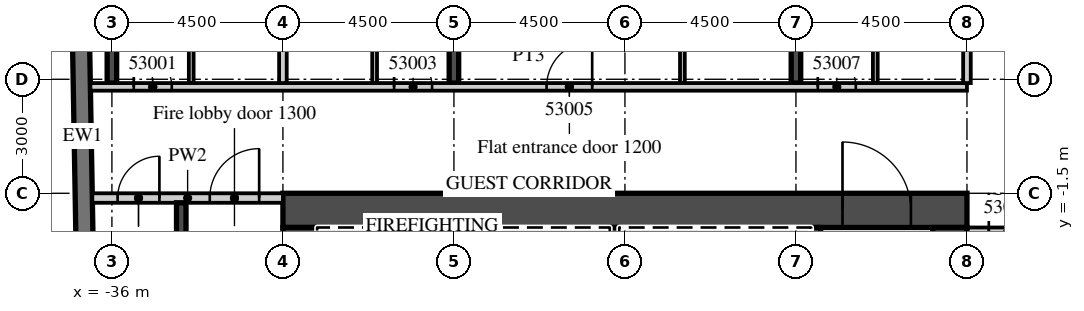
"""IFC4 building model, lengths in metres.
Left out: names, types, materials, properties, quantities, classifications, styles, units other than length and angle.
Written with IfcOpenShell. Run it as: python <this file> out.ifc"""

import sys

from ifc_helpers import new_model, si_unit, direction, frame, frame_2d, origin, place, context, subcontext, project, spatial, rectangle, extrude, element, fill, save


model = new_model("IFC4")
c1 = context("Model", 3, precision=1e-05, world=origin(), true_north=direction((0.0, 1.0)))
c2 = subcontext(c1, "Body", "Model", "MODEL_VIEW")
j1 = project(units=[si_unit("LENGTHUNIT", "METRE"), si_unit("PLANEANGLEUNIT", "RADIAN")], contexts=[c1])
p1 = place(None, origin())
s1 = spatial("IfcSite", under=j1, at=p1, CompositionType="ELEMENT")
p2 = place(p1, origin())
s2 = spatial("IfcBuilding", under=s1, at=p2, CompositionType="ELEMENT")
p3 = place(p2, frame((0.0, 0.0, 221.0)))
s3 = spatial("IfcBuildingStorey", under=s2, at=p3, CompositionType="ELEMENT", Elevation=221.0)
p4 = place(p3, frame((-36.0, 1.4, 0.0), z_axis=(0.0, 0.0, 1.0), x_axis=(0.0, 1.0, 0.0)))
e1 = element("IfcWall", 1, at=p4, inside=s3, PredefinedType="SHEAR", context=c2, shape_type="SweptSolid", body=[
    extrude(rectangle(XDim=17.125, YDim=0.25, at=frame_2d((8.563, 0.0))), origin(), (0.0, 0.0, 1.0), 3.3),
])
p5 = place(p3, frame((-27.0, 1.4, 0.0), z_axis=(0.0, 0.0, 1.0), x_axis=(0.0, 1.0, 0.0)))
e2 = element("IfcWall", 2, at=p5, inside=s3, PredefinedType="SHEAR", context=c2, shape_type="SweptSolid", body=[
    extrude(rectangle(XDim=18.817, YDim=0.25, at=frame_2d((9.409, 0.0))), origin(), (0.0, 0.0, 1.0), 3.3),
])
p6 = place(p3, frame((-18.0, 1.4, 0.0), z_axis=(0.0, 0.0, 1.0), x_axis=(0.0, 1.0, 0.0)))
e3 = element("IfcWall", 3, at=p6, inside=s3, PredefinedType="SHEAR", context=c2, shape_type="SweptSolid", body=[
    extrude(rectangle(XDim=18.974, YDim=0.25, at=frame_2d((9.487, 0.0))), origin(), (0.0, 0.0, 1.0), 3.3),
])
p7 = place(p3, frame((-37.057, 16.503, 0.0), z_axis=(0.0, 0.0, 1.0), x_axis=(0.017452279857, -0.999847697366, 0.0)))
e4 = element("IfcWall", 4, at=p7, inside=s3, PredefinedType="SOLIDWALL", context=c2, shape_type="SweptSolid", body=[
    extrude(rectangle(XDim=33.0, YDim=0.45, at=frame_2d((16.5, 0.0))), origin(), (0.0, 0.0, 1.0), 3.02),
])
p8 = place(p3, frame((-36.566, 1.3, 0.0), z_axis=(0.0, 0.0, 1.0), x_axis=(1.0, 0.0, 0.0)))
e5 = element("IfcWall", 5, at=p8, inside=s3, PredefinedType="PARTITIONING", context=c2, shape_type="SweptSolid", body=[
    extrude(rectangle(XDim=23.066, YDim=0.2, at=frame_2d((11.533, 0.0))), origin(), (0.0, 0.0, 1.0), 3.02),
])
p9 = place(p8, frame((1.141, 0.0, 0.0)))
e6 = element("IfcOpeningElement", 6, at=p9, cuts=e5, PredefinedType="OPENING", context=c2, shape_type="SweptSolid", body=[
    extrude(rectangle(XDim=1.0, YDim=2.1, at=frame_2d((0.5, 1.05))), frame((0.0, 0.11, 0.0), z_axis=(0.0, -1.0, 0.0), x_axis=(1.0, 0.0, 0.0)), (0.0, 0.0, 1.0), 0.22),
])
p10 = place(p8, frame((7.991, 0.0, 0.0)))
e7 = element("IfcOpeningElement", 7, at=p10, cuts=e5, PredefinedType="OPENING", context=c2, shape_type="SweptSolid", body=[
    extrude(rectangle(XDim=1.0, YDim=2.1, at=frame_2d((0.5, 1.05))), frame((0.0, 0.11, 0.0), z_axis=(0.0, -1.0, 0.0), x_axis=(1.0, 0.0, 0.0)), (0.0, 0.0, 1.0), 0.22),
])
p11 = place(p8, frame((12.004, 0.0, 0.0)))
e8 = element("IfcOpeningElement", 8, at=p11, cuts=e5, PredefinedType="OPENING", context=c2, shape_type="SweptSolid", body=[
    extrude(rectangle(XDim=1.2, YDim=2.1, at=frame_2d((0.6, 1.05))), frame((0.0, 0.11, 0.0), z_axis=(0.0, -1.0, 0.0), x_axis=(1.0, 0.0, 0.0)), (0.0, 0.0, 1.0), 0.22),
])
p12 = place(p8, frame((19.141, 0.0, 0.0)))
e9 = element("IfcOpeningElement", 9, at=p12, cuts=e5, PredefinedType="OPENING", context=c2, shape_type="SweptSolid", body=[
    extrude(rectangle(XDim=1.0, YDim=2.1, at=frame_2d((0.5, 1.05))), frame((0.0, 0.11, 0.0), z_axis=(0.0, -1.0, 0.0), x_axis=(1.0, 0.0, 0.0)), (0.0, 0.0, 1.0), 0.22),
])
p13 = place(p3, frame((-31.5, 1.4, 0.0), z_axis=(0.0, 0.0, 1.0), x_axis=(0.0, 1.0, 0.0)))
e10 = element("IfcWall", 10, at=p13, inside=s3, PredefinedType="PARTITIONING", context=c2, shape_type="SweptSolid", body=[
    extrude(rectangle(XDim=18.751, YDim=0.2, at=frame_2d((9.375, 0.0))), origin(), (0.0, 0.0, 1.0), 3.02),
])
p14 = place(p3, frame((-33.913, 1.4, 0.0), z_axis=(0.0, 0.0, 1.0), x_axis=(0.0, 1.0, 0.0)))
e11 = element("IfcWall", 11, at=p14, inside=s3, PredefinedType="PARTITIONING", context=c2, shape_type="SweptSolid", body=[
    extrude(rectangle(XDim=6.725, YDim=0.125, at=frame_2d((3.363, 0.0))), origin(), (0.0, 0.0, 1.0), 3.02),
])
p15 = place(p14, frame((2.45, 0.0, 0.0)))
e12 = element("IfcOpeningElement", 12, at=p15, cuts=e11, PredefinedType="OPENING", context=c2, shape_type="SweptSolid", body=[
    extrude(rectangle(XDim=0.9, YDim=2.1, at=frame_2d((0.45, 1.05))), frame((0.0, 0.073, 0.0), z_axis=(0.0, -1.0, 0.0), x_axis=(1.0, 0.0, 0.0)), (0.0, 0.0, 1.0), 0.145),
])
p16 = place(p3, frame((-29.087, 1.4, 0.0), z_axis=(0.0, 0.0, 1.0), x_axis=(0.0, 1.0, 0.0)))
e13 = element("IfcWall", 13, at=p16, inside=s3, PredefinedType="PARTITIONING", context=c2, shape_type="SweptSolid", body=[
    extrude(rectangle(XDim=6.725, YDim=0.125, at=frame_2d((3.363, 0.0))), origin(), (0.0, 0.0, 1.0), 3.02),
])
p17 = place(p16, frame((2.45, 0.0, 0.0)))
e14 = element("IfcOpeningElement", 14, at=p17, cuts=e13, PredefinedType="OPENING", context=c2, shape_type="SweptSolid", body=[
    extrude(rectangle(XDim=0.9, YDim=2.1, at=frame_2d((0.45, 1.05))), frame((0.0, 0.073, 0.0), z_axis=(0.0, -1.0, 0.0), x_axis=(1.0, 0.0, 0.0)), (0.0, 0.0, 1.0), 0.145),
])
p18 = place(p3, frame((-20.988, 1.4, 0.0), z_axis=(0.0, 0.0, 1.0), x_axis=(0.0, 1.0, 0.0)))
e15 = element("IfcWall", 15, at=p18, inside=s3, PredefinedType="PARTITIONING", context=c2, shape_type="SweptSolid", body=[
    extrude(rectangle(XDim=6.725, YDim=0.125, at=frame_2d((3.363, 0.0))), origin(), (0.0, 0.0, 1.0), 3.02),
])
p19 = place(p18, frame((2.45, 0.0, 0.0)))
e16 = element("IfcOpeningElement", 16, at=p19, cuts=e15, PredefinedType="OPENING", context=c2, shape_type="SweptSolid", body=[
    extrude(rectangle(XDim=0.9, YDim=2.1, at=frame_2d((0.45, 1.05))), frame((0.0, 0.073, 0.0), z_axis=(0.0, -1.0, 0.0), x_axis=(1.0, 0.0, 0.0)), (0.0, 0.0, 1.0), 0.145),
])
p20 = place(p3, frame((-13.5, 1.4, 0.0), z_axis=(0.0, 0.0, 1.0), x_axis=(0.0, 1.0, 0.0)))
e17 = element("IfcWall", 17, at=p20, inside=s3, PredefinedType="PARTITIONING", context=c2, shape_type="SweptSolid", body=[
    extrude(rectangle(XDim=19.065, YDim=0.2, at=frame_2d((9.533, 0.0))), origin(), (0.0, 0.0, 1.0), 3.02),
])
p21 = place(p3, frame((-15.912, 1.4, 0.0), z_axis=(0.0, 0.0, 1.0), x_axis=(0.0, 1.0, 0.0)))
e18 = element("IfcWall", 18, at=p21, inside=s3, PredefinedType="PARTITIONING", context=c2, shape_type="SweptSolid", body=[
    extrude(rectangle(XDim=6.725, YDim=0.125, at=frame_2d((3.363, 0.0))), origin(), (0.0, 0.0, 1.0), 3.02),
])
p22 = place(p21, frame((2.45, 0.0, 0.0)))
e19 = element("IfcOpeningElement", 19, at=p22, cuts=e18, PredefinedType="OPENING", context=c2, shape_type="SweptSolid", body=[
    extrude(rectangle(XDim=0.9, YDim=2.1, at=frame_2d((0.45, 1.05))), frame((0.0, 0.073, 0.0), z_axis=(0.0, -1.0, 0.0), x_axis=(1.0, 0.0, 0.0)), (0.0, 0.0, 1.0), 0.145),
])
p23 = place(p3, frame((-13.5, -2.5, 0.0), z_axis=(0.0, 0.0, 1.0), x_axis=(1.0, 0.0, 0.0)))
e20 = element("IfcWall", 20, at=p23, inside=s3, PredefinedType="PARTITIONING", context=c2, shape_type="SweptSolid", body=[
    extrude(rectangle(XDim=27.0, YDim=0.2, at=frame_2d((13.5, 0.0))), origin(), (0.0, 0.0, 1.0), 3.02),
])
p24 = place(p23, frame((0.575, 0.0, 0.0)))
e21 = element("IfcOpeningElement", 21, at=p24, cuts=e20, PredefinedType="OPENING", context=c2, shape_type="SweptSolid", body=[
    extrude(rectangle(XDim=1.0, YDim=2.1, at=frame_2d((0.5, 1.05))), frame((0.0, 0.11, 0.0), z_axis=(0.0, -1.0, 0.0), x_axis=(1.0, 0.0, 0.0)), (0.0, 0.0, 1.0), 0.22),
])
p25 = place(p23, frame((6.938, 0.0, 0.0)))
e22 = element("IfcOpeningElement", 22, at=p25, cuts=e20, PredefinedType="OPENING", context=c2, shape_type="SweptSolid", body=[
    extrude(rectangle(XDim=1.2, YDim=2.1, at=frame_2d((0.6, 1.05))), frame((0.0, 0.11, 0.0), z_axis=(0.0, -1.0, 0.0), x_axis=(1.0, 0.0, 0.0)), (0.0, 0.0, 1.0), 0.22),
])
p26 = place(p23, frame((15.938, 0.0, 0.0)))
e23 = element("IfcOpeningElement", 23, at=p26, cuts=e20, PredefinedType="OPENING", context=c2, shape_type="SweptSolid", body=[
    extrude(rectangle(XDim=1.2, YDim=2.1, at=frame_2d((0.6, 1.05))), frame((0.0, 0.11, 0.0), z_axis=(0.0, -1.0, 0.0), x_axis=(1.0, 0.0, 0.0)), (0.0, 0.0, 1.0), 0.22),
])
p27 = place(p23, frame((25.425, 0.0, 0.0)))
e24 = element("IfcOpeningElement", 24, at=p27, cuts=e20, PredefinedType="OPENING", context=c2, shape_type="SweptSolid", body=[
    extrude(rectangle(XDim=1.0, YDim=2.1, at=frame_2d((0.5, 1.05))), frame((0.0, 0.11, 0.0), z_axis=(0.0, -1.0, 0.0), x_axis=(1.0, 0.0, 0.0)), (0.0, 0.0, 1.0), 0.22),
])
p28 = place(p3, frame((-31.5, -1.95, 0.0), z_axis=(0.0, 0.0, 1.0), x_axis=(1.0, 0.0, 0.0)))
e25 = element("IfcWall", 25, at=p28, inside=s3, PredefinedType="SHEAR", context=c2, shape_type="SweptSolid", body=[
    extrude(rectangle(XDim=18.0, YDim=0.9, at=frame_2d((9.0, 0.0))), origin(), (0.0, 0.0, 1.0), 3.02),
])
p29 = place(p28, frame((14.725, 0.0, 0.0)))
e26 = element("IfcOpeningElement", 26, at=p29, cuts=e25, PredefinedType="OPENING", context=c2, shape_type="SweptSolid", body=[
    extrude(rectangle(XDim=1.8, YDim=2.1, at=frame_2d((0.9, 1.05))), frame((0.0, 0.46, 0.0), z_axis=(0.0, -1.0, 0.0), x_axis=(1.0, 0.0, 0.0)), (0.0, 0.0, 1.0), 0.92),
])
p30 = place(p3, frame((-31.05, -15.2, 0.0), z_axis=(0.0, 0.0, 1.0), x_axis=(0.0, 1.0, 0.0)))
e27 = element("IfcWall", 27, at=p30, inside=s3, PredefinedType="SHEAR", context=c2, shape_type="SweptSolid", body=[
    extrude(rectangle(XDim=12.8, YDim=0.9, at=frame_2d((6.4, 0.0))), origin(), (0.0, 0.0, 1.0), 3.02),
])
p31 = place(p30, frame((11.5, 0.0, 0.0)))
e28 = element("IfcOpeningElement", 28, at=p31, cuts=e27, PredefinedType="OPENING", context=c2, shape_type="SweptSolid", body=[
    extrude(rectangle(XDim=1.1, YDim=2.1, at=frame_2d((0.55, 1.05))), frame((0.0, 0.46, 0.0), z_axis=(0.0, -1.0, 0.0), x_axis=(1.0, 0.0, 0.0)), (0.0, 0.0, 1.0), 0.92),
])
p32 = place(p3, frame((-13.95, -14.6, 0.0), z_axis=(0.0, 0.0, 1.0), x_axis=(0.0, 1.0, 0.0)))
e29 = element("IfcWall", 29, at=p32, inside=s3, PredefinedType="SHEAR", context=c2, shape_type="SweptSolid", body=[
    extrude(rectangle(XDim=12.2, YDim=0.9, at=frame_2d((6.1, 0.0))), origin(), (0.0, 0.0, 1.0), 3.02),
])
p33 = place(p3, frame((-17.475, -5.55, 0.0), z_axis=(0.0, 0.0, 1.0), x_axis=(0.0, 1.0, 0.0)))
e30 = element("IfcWall", 30, at=p33, inside=s3, PredefinedType="SHEAR", context=c2, shape_type="SweptSolid", body=[
    extrude(rectangle(XDim=3.15, YDim=0.25, at=frame_2d((1.575, 0.0))), origin(), (0.0, 0.0, 1.0), 3.02),
])
for number, where, z_axis, x_axis in (
    (31, (-27.975, -5.3, 0.0), (0.0, 0.0, 1.0), (0.0, 1.0, 0.0)),
    (32, (-22.775, -5.3, 0.0), (0.0, 0.0, 1.0), (0.0, 1.0, 0.0)),
):
    element("IfcWall", number, at=place(p3, frame(where, z_axis=z_axis, x_axis=x_axis)), inside=s3, PredefinedType="SHEAR", context=c2, shape_type="SweptSolid", body=[
        extrude(rectangle(XDim=2.9, YDim=0.25, at=frame_2d((1.45, 0.0))), origin(), (0.0, 0.0, 1.0), 3.02),
    ])
p34 = place(p3, frame((-36.515, -1.625, 0.0), z_axis=(0.0, 0.0, 1.0), x_axis=(1.0, 0.0, 0.0)))
e33 = element("IfcWall", 33, at=p34, inside=s3, PredefinedType="PARTITIONING", context=c2, shape_type="SweptSolid", body=[
    extrude(rectangle(XDim=5.015, YDim=0.25, at=frame_2d((2.508, 0.0))), origin(), (0.0, 0.0, 1.0), 3.02),
])
p35 = place(p34, frame((3.09, 0.0, 0.0)))
e34 = element("IfcOpeningElement", 34, at=p35, cuts=e33, PredefinedType="OPENING", context=c2, shape_type="SweptSolid", body=[
    extrude(rectangle(XDim=1.3, YDim=2.1, at=frame_2d((0.65, 1.05))), frame((0.0, 0.135, 0.0), z_axis=(0.0, -1.0, 0.0), x_axis=(1.0, 0.0, 0.0)), (0.0, 0.0, 1.0), 0.27),
])
p36 = place(p34, frame((0.665, 0.0, 0.0)))
e35 = element("IfcOpeningElement", 35, at=p36, cuts=e33, PredefinedType="OPENING", context=c2, shape_type="SweptSolid", body=[
    extrude(rectangle(XDim=1.1, YDim=2.1, at=frame_2d((0.55, 1.05))), frame((0.0, 0.135, 0.0), z_axis=(0.0, -1.0, 0.0), x_axis=(1.0, 0.0, 0.0)), (0.0, 0.0, 1.0), 0.27),
])
p37 = place(p3, frame((-34.175, -10.1, 0.0), z_axis=(0.0, 0.0, 1.0), x_axis=(0.0, 1.0, 0.0)))
e36 = element("IfcWall", 36, at=p37, inside=s3, PredefinedType="SHEAR", context=c2, shape_type="SweptSolid", body=[
    extrude(rectangle(XDim=8.35, YDim=0.25, at=frame_2d((4.175, 0.0))), origin(), (0.0, 0.0, 1.0), 3.02),
])
p38 = place(p9, origin())
e37 = element("IfcDoor", 37, at=p38, inside=s3, OperationType="SINGLE_SWING_LEFT", PredefinedType="DOOR", context=c2, shape_type="SweptSolid", body=[
    extrude(rectangle(XDim=1.0, YDim=2.1, at=frame_2d((0.5, 1.05))), frame((0.0, 0.025, 0.0), z_axis=(0.0, -1.0, 0.0), x_axis=(1.0, 0.0, 0.0)), (0.0, 0.0, 1.0), 0.05),
])
fill(e6, e37)
p39 = place(p10, origin())
e38 = element("IfcDoor", 38, at=p39, inside=s3, OperationType="SINGLE_SWING_LEFT", PredefinedType="DOOR", context=c2, shape_type="SweptSolid", body=[
    extrude(rectangle(XDim=1.0, YDim=2.1, at=frame_2d((0.5, 1.05))), frame((0.0, 0.025, 0.0), z_axis=(0.0, -1.0, 0.0), x_axis=(1.0, 0.0, 0.0)), (0.0, 0.0, 1.0), 0.05),
])
fill(e7, e38)
p40 = place(p11, origin())
e39 = element("IfcDoor", 39, at=p40, inside=s3, OperationType="SINGLE_SWING_RIGHT", PredefinedType="DOOR", context=c2, shape_type="SweptSolid", body=[
    extrude(rectangle(XDim=1.2, YDim=2.1, at=frame_2d((0.6, 1.05))), frame((0.0, 0.025, 0.0), z_axis=(0.0, -1.0, 0.0), x_axis=(1.0, 0.0, 0.0)), (0.0, 0.0, 1.0), 0.05),
])
fill(e8, e39)
p41 = place(p12, origin())
e40 = element("IfcDoor", 40, at=p41, inside=s3, OperationType="SINGLE_SWING_LEFT", PredefinedType="DOOR", context=c2, shape_type="SweptSolid", body=[
    extrude(rectangle(XDim=1.0, YDim=2.1, at=frame_2d((0.5, 1.05))), frame((0.0, 0.025, 0.0), z_axis=(0.0, -1.0, 0.0), x_axis=(1.0, 0.0, 0.0)), (0.0, 0.0, 1.0), 0.05),
])
fill(e9, e40)
p42 = place(p24, origin())
e41 = element("IfcDoor", 41, at=p42, inside=s3, OperationType="SINGLE_SWING_LEFT", PredefinedType="DOOR", context=c2, shape_type="SweptSolid", body=[
    extrude(rectangle(XDim=1.0, YDim=2.1, at=frame_2d((0.5, 1.05))), frame((0.0, 0.025, 0.0), z_axis=(0.0, -1.0, 0.0), x_axis=(1.0, 0.0, 0.0)), (0.0, 0.0, 1.0), 0.05),
])
fill(e21, e41)
p43 = place(p29, origin())
e42 = element("IfcDoor", 42, at=p43, inside=s3, OperationType="DOUBLE_DOOR_DOUBLE_SWING", PredefinedType="DOOR", context=c2, shape_type="SweptSolid", body=[
    extrude(rectangle(XDim=1.8, YDim=2.1, at=frame_2d((0.9, 1.05))), frame((0.0, 0.025, 0.0), z_axis=(0.0, -1.0, 0.0), x_axis=(1.0, 0.0, 0.0)), (0.0, 0.0, 1.0), 0.05),
])
fill(e26, e42)
p44 = place(p35, origin())
e43 = element("IfcDoor", 43, at=p44, inside=s3, OperationType="SINGLE_SWING_RIGHT", PredefinedType="DOOR", context=c2, shape_type="SweptSolid", body=[
    extrude(rectangle(XDim=1.3, YDim=2.1, at=frame_2d((0.65, 1.05))), frame((0.0, 0.025, 0.0), z_axis=(0.0, -1.0, 0.0), x_axis=(1.0, 0.0, 0.0)), (0.0, 0.0, 1.0), 0.05),
])
fill(e34, e43)
p45 = place(p36, origin())
e44 = element("IfcDoor", 44, at=p45, inside=s3, OperationType="SINGLE_SWING_RIGHT", PredefinedType="DOOR", context=c2, shape_type="SweptSolid", body=[
    extrude(rectangle(XDim=1.1, YDim=2.1, at=frame_2d((0.55, 1.05))), frame((0.0, 0.025, 0.0), z_axis=(0.0, -1.0, 0.0), x_axis=(1.0, 0.0, 0.0)), (0.0, 0.0, 1.0), 0.05),
])
fill(e35, e44)
save(model, sys.argv[1])
